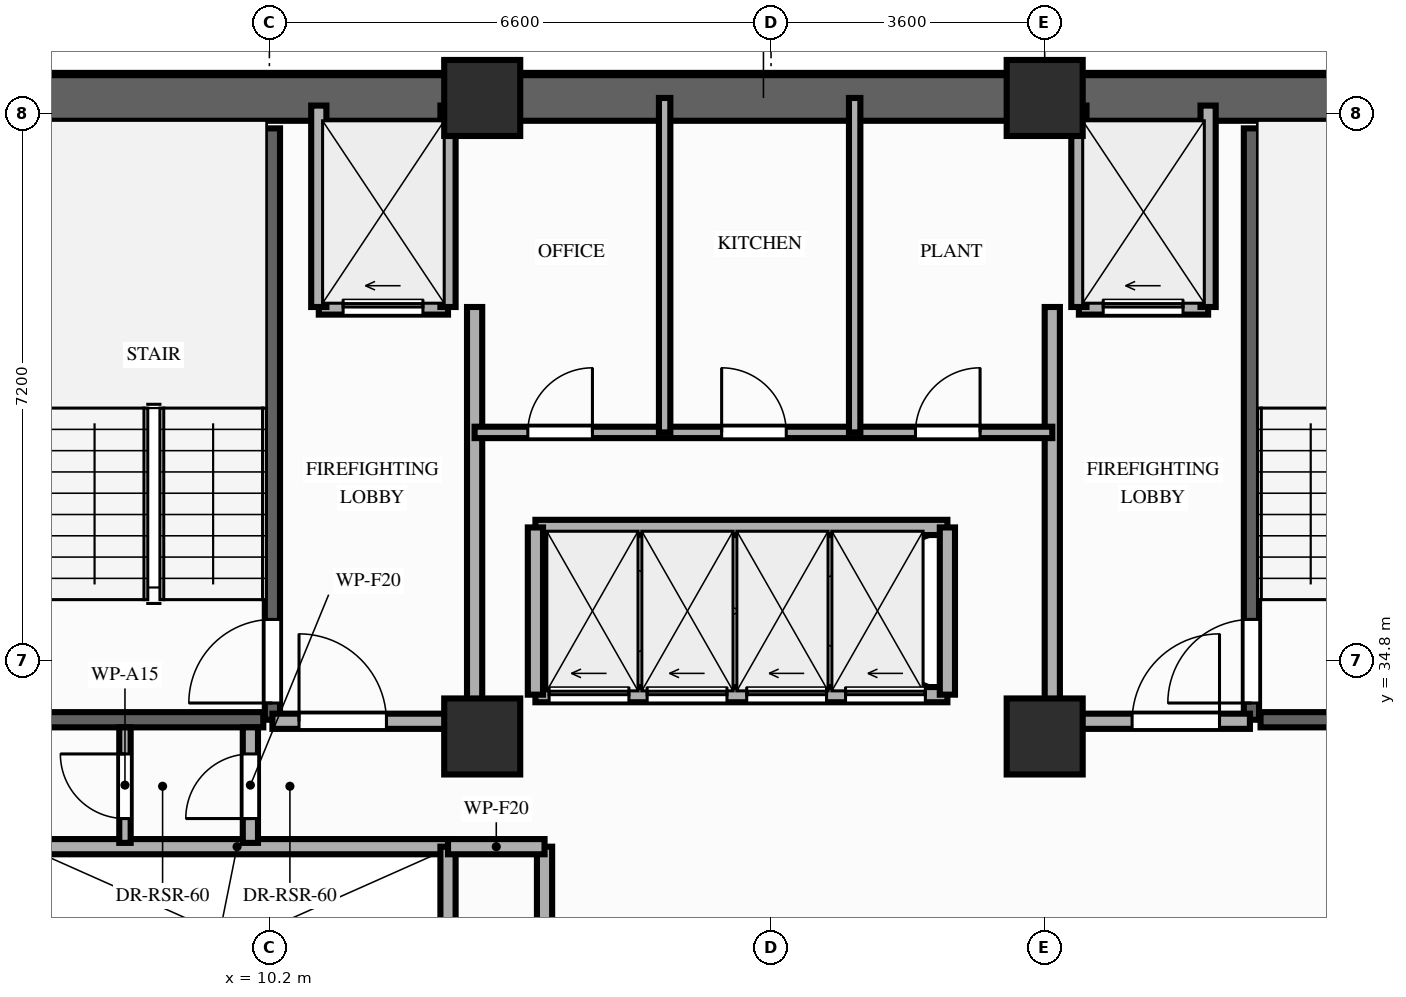
"""IFC4 building model, lengths in metres.
Left out: names, types, materials, properties, quantities, classifications, styles, units other than length and angle.
Written with IfcOpenShell. Run it as: python <this file> out.ifc"""

import sys

from ifc_helpers import new_model, si_unit, direction, frame, frame_2d, origin, origin_2d, place, context, subcontext, project, spatial, rectangle, extrude, element, fill, save


model = new_model("IFC4")
c1 = context("Model", 3, precision=1e-05, world=origin(), true_north=direction((0.0, 1.0)))
c2 = subcontext(c1, "Body", "Model", "MODEL_VIEW")
j1 = project(units=[si_unit("LENGTHUNIT", "METRE"), si_unit("PLANEANGLEUNIT", "RADIAN")], contexts=[c1])
p1 = place(None, origin())
s1 = spatial("IfcSite", under=j1, at=p1, CompositionType="ELEMENT")
p2 = place(p1, origin())
s2 = spatial("IfcBuilding", under=s1, at=p2, CompositionType="ELEMENT")
p3 = place(p2, frame((0.0, 0.0, 142.6)))
s3 = spatial("IfcBuildingStorey", under=s2, at=p3, CompositionType="ELEMENT", Elevation=142.6)
for number, where, z_axis, x_axis in (
    (1, (13.0, 33.8, 0.0), (0.0, 0.0, 1.0), (1.0, 0.0, 0.0)),
    (2, (20.4, 33.8, 0.0), (0.0, 0.0, 1.0), (1.0, 0.0, 0.0)),
    (3, (13.0, 42.2, 0.0), (0.0, 0.0, 1.0), (1.0, 0.0, 0.0)),
    (4, (20.4, 42.2, 0.0), (0.0, 0.0, 1.0), (1.0, 0.0, 0.0)),
):
    element("IfcColumn", number, at=place(p3, frame(where, z_axis=z_axis, x_axis=x_axis)), inside=s3, PredefinedType="COLUMN", context=c2, shape_type="SweptSolid", body=[
        extrude(rectangle(XDim=1.0, YDim=1.0, at=origin_2d()), origin(), (0.0, 0.0, 1.0), 3.2),
    ])
p4 = place(p3, frame((6.45, 42.2, 0.0), z_axis=(0.0, 0.0, 1.0), x_axis=(1.0, 0.0, 0.0)))
e5 = element("IfcWall", 5, at=p4, inside=s3, PredefinedType="SHEAR", context=c2, shape_type="SweptSolid", body=[
    extrude(rectangle(XDim=20.45, YDim=0.6, at=frame_2d((10.225, 0.0))), origin(), (0.0, 0.0, 1.0), 3.02),
])
p5 = place(p3, frame((10.24, 34.02, 0.0), z_axis=(0.0, 0.0, 1.0), x_axis=(0.0, 1.0, 0.0)))
e6 = element("IfcWall", 6, at=p5, inside=s3, PredefinedType="SHEAR", context=c2, shape_type="SweptSolid", body=[
    extrude(rectangle(XDim=7.78, YDim=0.2, at=frame_2d((3.89, 0.0))), origin(), (0.0, 0.0, 1.0), 3.02),
])
p6 = place(p5, frame((0.22, 0.0, 0.0)))
e7 = element("IfcOpeningElement", 7, at=p6, cuts=e6, PredefinedType="OPENING", context=c2, shape_type="SweptSolid", body=[
    extrude(rectangle(XDim=1.1, YDim=2.15, at=frame_2d((0.55, 1.075))), frame((0.0, 0.11, 0.0), z_axis=(0.0, -1.0, 0.0), x_axis=(1.0, 0.0, 0.0)), (0.0, 0.0, 1.0), 0.22),
])
p7 = place(p3, frame((7.24, 34.02, 0.0), z_axis=(0.0, 0.0, 1.0), x_axis=(1.0, 0.0, 0.0)))
e8 = element("IfcWall", 8, at=p7, inside=s3, PredefinedType="SHEAR", context=c2, shape_type="SweptSolid", body=[
    extrude(rectangle(XDim=2.88, YDim=0.2, at=frame_2d((1.44, 0.0))), origin(), (0.0, 0.0, 1.0), 3.02),
])
p8 = place(p3, frame((23.12, 34.02, 0.0), z_axis=(0.0, 0.0, 1.0), x_axis=(0.0, 1.0, 0.0)))
e9 = element("IfcWall", 9, at=p8, inside=s3, PredefinedType="SHEAR", context=c2, shape_type="SweptSolid", body=[
    extrude(rectangle(XDim=7.78, YDim=0.2, at=frame_2d((3.89, 0.0))), origin(), (0.0, 0.0, 1.0), 3.02),
])
p9 = place(p8, frame((0.22, 0.0, 0.0)))
e10 = element("IfcOpeningElement", 10, at=p9, cuts=e9, PredefinedType="OPENING", context=c2, shape_type="SweptSolid", body=[
    extrude(rectangle(XDim=1.1, YDim=2.15, at=frame_2d((0.55, 1.075))), frame((0.0, 0.11, 0.0), z_axis=(0.0, -1.0, 0.0), x_axis=(1.0, 0.0, 0.0)), (0.0, 0.0, 1.0), 0.22),
])
p10 = place(p3, frame((23.24, 34.02, 0.0), z_axis=(0.0, 0.0, 1.0), x_axis=(1.0, 0.0, 0.0)))
e11 = element("IfcWall", 11, at=p10, inside=s3, PredefinedType="SHEAR", context=c2, shape_type="SweptSolid", body=[
    extrude(rectangle(XDim=2.88, YDim=0.2, at=frame_2d((1.44, 0.0))), origin(), (0.0, 0.0, 1.0), 3.02),
])
p11 = place(p3, frame((7.0, 32.35, 0.0), z_axis=(0.0, 0.0, 1.0), x_axis=(1.0, 0.0, 0.0)))
e12 = element("IfcWall", 12, at=p11, inside=s3, PredefinedType="MOVABLE", context=c2, shape_type="SweptSolid", body=[
    extrude(rectangle(XDim=5.55, YDim=0.2, at=frame_2d((2.775, 0.0))), origin(), (0.0, 0.0, 1.0), 3.02),
])
p12 = place(p3, frame((12.55, 29.85, 0.0), z_axis=(0.0, 0.0, 1.0), x_axis=(0.0, 1.0, 0.0)))
e13 = element("IfcWall", 13, at=p12, inside=s3, PredefinedType="MOVABLE", context=c2, shape_type="SweptSolid", body=[
    extrude(rectangle(XDim=2.5, YDim=0.2, at=frame_2d((1.25, 0.0))), origin(), (0.0, 0.0, 1.0), 3.02),
])
p13 = place(p3, frame((10.85, 39.45, 0.0), z_axis=(0.0, 0.0, 1.0), x_axis=(1.0, 0.0, 0.0)))
e14 = element("IfcWall", 14, at=p13, inside=s3, PredefinedType="MOVABLE", context=c2, shape_type="SweptSolid", body=[
    extrude(rectangle(XDim=1.7, YDim=0.2, at=frame_2d((0.85, 0.0))), origin(), (0.0, 0.0, 1.0), 3.02),
])
p14 = place(p13, frame((0.32, 0.0, 0.0)))
e15 = element("IfcOpeningElement", 15, at=p14, cuts=e14, PredefinedType="OPENING", context=c2, shape_type="SweptSolid", body=[
    extrude(rectangle(XDim=1.05, YDim=2.15, at=frame_2d((0.525, 1.075))), frame((0.0, 0.11, 0.0), z_axis=(0.0, -1.0, 0.0), x_axis=(1.0, 0.0, 0.0)), (0.0, 0.0, 1.0), 0.22),
])
p15 = place(p3, frame((20.85, 39.45, 0.0), z_axis=(0.0, 0.0, 1.0), x_axis=(1.0, 0.0, 0.0)))
e16 = element("IfcWall", 16, at=p15, inside=s3, PredefinedType="MOVABLE", context=c2, shape_type="SweptSolid", body=[
    extrude(rectangle(XDim=1.7, YDim=0.2, at=frame_2d((0.85, 0.0))), origin(), (0.0, 0.0, 1.0), 3.02),
])
p16 = place(p15, frame((0.32, 0.0, 0.0)))
e17 = element("IfcOpeningElement", 17, at=p16, cuts=e16, PredefinedType="OPENING", context=c2, shape_type="SweptSolid", body=[
    extrude(rectangle(XDim=1.05, YDim=2.15, at=frame_2d((0.525, 1.075))), frame((0.0, 0.11, 0.0), z_axis=(0.0, -1.0, 0.0), x_axis=(1.0, 0.0, 0.0)), (0.0, 0.0, 1.0), 0.22),
])
for number, where, z_axis, x_axis in (
    (18, (10.85, 39.45, 0.0), (0.0, 0.0, 1.0), (0.0, 1.0, 0.0)),
    (19, (12.55, 39.45, 0.0), (0.0, 0.0, 1.0), (0.0, 1.0, 0.0)),
):
    element("IfcWall", number, at=place(p3, frame(where, z_axis=z_axis, x_axis=x_axis)), inside=s3, PredefinedType="MOVABLE", context=c2, shape_type="SweptSolid", body=[
        extrude(rectangle(XDim=2.65, YDim=0.2, at=frame_2d((1.325, 0.0))), origin(), (0.0, 0.0, 1.0), 2.45),
    ])
p17 = place(p3, frame((12.9, 34.0, 0.0), z_axis=(0.0, 0.0, 1.0), x_axis=(0.0, 1.0, 0.0)))
e20 = element("IfcWall", 20, at=p17, inside=s3, PredefinedType="PARTITIONING", context=c2, shape_type="SweptSolid", body=[
    extrude(rectangle(XDim=5.45, YDim=0.2, at=frame_2d((2.725, 0.0))), origin(), (0.0, 0.0, 1.0), 2.45),
])
p18 = place(p3, frame((10.24, 34.0, 0.0), z_axis=(0.0, 0.0, 1.0), x_axis=(1.0, 0.0, 0.0)))
e21 = element("IfcWall", 21, at=p18, inside=s3, PredefinedType="PARTITIONING", context=c2, shape_type="SweptSolid", body=[
    extrude(rectangle(XDim=2.66, YDim=0.2, at=frame_2d((1.33, 0.0))), origin(), (0.0, 0.0, 1.0), 2.45),
])
p19 = place(p18, frame((0.35, 0.0, 0.0)))
e22 = element("IfcOpeningElement", 22, at=p19, cuts=e21, PredefinedType="OPENING", context=c2, shape_type="SweptSolid", body=[
    extrude(rectangle(XDim=1.15, YDim=2.15, at=frame_2d((0.575, 1.075))), frame((0.0, 0.11, 0.0), z_axis=(0.0, -1.0, 0.0), x_axis=(1.0, 0.0, 0.0)), (0.0, 0.0, 1.0), 0.22),
])
for number, where, z_axis, x_axis in (
    (23, (20.85, 39.45, 0.0), (0.0, 0.0, 1.0), (0.0, 1.0, 0.0)),
    (24, (22.55, 39.45, 0.0), (0.0, 0.0, 1.0), (0.0, 1.0, 0.0)),
):
    element("IfcWall", number, at=place(p3, frame(where, z_axis=z_axis, x_axis=x_axis)), inside=s3, PredefinedType="MOVABLE", context=c2, shape_type="SweptSolid", body=[
        extrude(rectangle(XDim=2.65, YDim=0.2, at=frame_2d((1.325, 0.0))), origin(), (0.0, 0.0, 1.0), 2.45),
    ])
p20 = place(p3, frame((20.5, 34.0, 0.0), z_axis=(0.0, 0.0, 1.0), x_axis=(0.0, 1.0, 0.0)))
e25 = element("IfcWall", 25, at=p20, inside=s3, PredefinedType="PARTITIONING", context=c2, shape_type="SweptSolid", body=[
    extrude(rectangle(XDim=5.45, YDim=0.2, at=frame_2d((2.725, 0.0))), origin(), (0.0, 0.0, 1.0), 2.45),
])
p21 = place(p3, frame((20.5, 34.0, 0.0), z_axis=(0.0, 0.0, 1.0), x_axis=(1.0, 0.0, 0.0)))
e26 = element("IfcWall", 26, at=p21, inside=s3, PredefinedType="PARTITIONING", context=c2, shape_type="SweptSolid", body=[
    extrude(rectangle(XDim=2.6, YDim=0.2, at=frame_2d((1.3, 0.0))), origin(), (0.0, 0.0, 1.0), 2.45),
])
p22 = place(p21, frame((1.05, 0.0, 0.0)))
e27 = element("IfcOpeningElement", 27, at=p22, cuts=e26, PredefinedType="OPENING", context=c2, shape_type="SweptSolid", body=[
    extrude(rectangle(XDim=1.15, YDim=2.15, at=frame_2d((0.575, 1.075))), frame((0.0, 0.11, 0.0), z_axis=(0.0, -1.0, 0.0), x_axis=(1.0, 0.0, 0.0)), (0.0, 0.0, 1.0), 0.22),
])
p23 = place(p3, frame((9.95, 32.4, 0.0), z_axis=(0.0, 0.0, 1.0), x_axis=(0.0, 1.0, 0.0)))
e28 = element("IfcWall", 28, at=p23, inside=s3, PredefinedType="PARTITIONING", context=c2, shape_type="SweptSolid", body=[
    extrude(rectangle(XDim=1.52, YDim=0.2, at=frame_2d((0.76, 0.0))), origin(), (0.0, 0.0, 1.0), 2.45),
])
p24 = place(p23, frame((0.32, 0.0, 0.0)))
e29 = element("IfcOpeningElement", 29, at=p24, cuts=e28, PredefinedType="OPENING", context=c2, shape_type="SweptSolid", body=[
    extrude(rectangle(XDim=0.85, YDim=2.05, at=frame_2d((0.425, 1.025))), frame((0.0, 0.11, 0.0), z_axis=(0.0, -1.0, 0.0), x_axis=(1.0, 0.0, 0.0)), (0.0, 0.0, 1.0), 0.22),
])
p25 = place(p3, frame((8.3, 32.4, 0.0), z_axis=(0.0, 0.0, 1.0), x_axis=(0.0, 1.0, 0.0)))
e30 = element("IfcWall", 30, at=p25, inside=s3, PredefinedType="PARTITIONING", context=c2, shape_type="SweptSolid", body=[
    extrude(rectangle(XDim=1.52, YDim=0.15, at=frame_2d((0.76, 0.0))), origin(), (0.0, 0.0, 1.0), 2.45),
])
p26 = place(p25, frame((0.32, 0.0, 0.0)))
e31 = element("IfcOpeningElement", 31, at=p26, cuts=e30, PredefinedType="OPENING", context=c2, shape_type="SweptSolid", body=[
    extrude(rectangle(XDim=0.85, YDim=2.05, at=frame_2d((0.425, 1.025))), frame((0.0, 0.085, 0.0), z_axis=(0.0, -1.0, 0.0), x_axis=(1.0, 0.0, 0.0)), (0.0, 0.0, 1.0), 0.17),
])
p27 = place(p3, frame((13.82, 29.85, 0.0), z_axis=(0.0, 0.0, 1.0), x_axis=(0.0, 1.0, 0.0)))
e32 = element("IfcWall", 32, at=p27, inside=s3, PredefinedType="PARTITIONING", context=c2, shape_type="SweptSolid", body=[
    extrude(rectangle(XDim=2.5, YDim=0.2, at=frame_2d((1.25, 0.0))), origin(), (0.0, 0.0, 1.0), 3.02),
])
p28 = place(p3, frame((12.55, 32.35, 0.0), z_axis=(0.0, 0.0, 1.0), x_axis=(1.0, 0.0, 0.0)))
e33 = element("IfcWall", 33, at=p28, inside=s3, PredefinedType="PARTITIONING", context=c2, shape_type="SweptSolid", body=[
    extrude(rectangle(XDim=1.27, YDim=0.2, at=frame_2d((0.635, 0.0))), origin(), (0.0, 0.0, 1.0), 3.02),
])
p29 = place(p3, frame((12.9, 37.8, 0.0), z_axis=(0.0, 0.0, 1.0), x_axis=(1.0, 0.0, 0.0)))
e34 = element("IfcWall", 34, at=p29, inside=s3, PredefinedType="PARTITIONING", context=c2, shape_type="SweptSolid", body=[
    extrude(rectangle(XDim=7.6, YDim=0.15, at=frame_2d((3.8, 0.0))), origin(), (0.0, 0.0, 1.0), 3.02),
])
p30 = place(p29, frame((0.7, 0.0, 0.0)))
e35 = element("IfcOpeningElement", 35, at=p30, cuts=e34, PredefinedType="OPENING", context=c2, shape_type="SweptSolid", body=[
    extrude(rectangle(XDim=0.85, YDim=2.05, at=frame_2d((0.425, 1.025))), frame((0.0, 0.085, 0.0), z_axis=(0.0, -1.0, 0.0), x_axis=(1.0, 0.0, 0.0)), (0.0, 0.0, 1.0), 0.17),
])
p31 = place(p29, frame((3.25, 0.0, 0.0)))
e36 = element("IfcOpeningElement", 36, at=p31, cuts=e34, PredefinedType="OPENING", context=c2, shape_type="SweptSolid", body=[
    extrude(rectangle(XDim=0.85, YDim=2.05, at=frame_2d((0.425, 1.025))), frame((0.0, 0.085, 0.0), z_axis=(0.0, -1.0, 0.0), x_axis=(1.0, 0.0, 0.0)), (0.0, 0.0, 1.0), 0.17),
])
p32 = place(p29, frame((5.8, 0.0, 0.0)))
e37 = element("IfcOpeningElement", 37, at=p32, cuts=e34, PredefinedType="OPENING", context=c2, shape_type="SweptSolid", body=[
    extrude(rectangle(XDim=0.85, YDim=2.05, at=frame_2d((0.425, 1.025))), frame((0.0, 0.085, 0.0), z_axis=(0.0, -1.0, 0.0), x_axis=(1.0, 0.0, 0.0)), (0.0, 0.0, 1.0), 0.17),
])
for number, where, z_axis, x_axis in (
    (38, (15.4, 37.8, 0.0), (0.0, 0.0, 1.0), (0.0, 1.0, 0.0)),
    (39, (17.9, 37.8, 0.0), (0.0, 0.0, 1.0), (0.0, 1.0, 0.0)),
):
    element("IfcWall", number, at=place(p3, frame(where, z_axis=z_axis, x_axis=x_axis)), inside=s3, PredefinedType="PARTITIONING", context=c2, shape_type="SweptSolid", body=[
        extrude(rectangle(XDim=4.4, YDim=0.15, at=frame_2d((2.2, 0.0))), origin(), (0.0, 0.0, 1.0), 2.45),
    ])
p33 = place(p3, frame((13.7, 34.35, 0.0), z_axis=(0.0, 0.0, 1.0), x_axis=(1.0, 0.0, 0.0)))
e40 = element("IfcWall", 40, at=p33, inside=s3, PredefinedType="MOVABLE", context=c2, shape_type="SweptSolid", body=[
    extrude(rectangle(XDim=5.42, YDim=0.2, at=frame_2d((2.71, 0.0))), origin(), (0.0, 0.0, 1.0), 3.02),
])
p34 = place(p33, frame((0.18, 0.0, 0.0)))
e41 = element("IfcOpeningElement", 41, at=p34, cuts=e40, PredefinedType="OPENING", context=c2, shape_type="SweptSolid", body=[
    extrude(rectangle(XDim=1.05, YDim=2.15, at=frame_2d((0.525, 1.075))), frame((0.0, 0.11, 0.0), z_axis=(0.0, -1.0, 0.0), x_axis=(1.0, 0.0, 0.0)), (0.0, 0.0, 1.0), 0.22),
])
p35 = place(p33, frame((1.47, 0.0, 0.0)))
e42 = element("IfcOpeningElement", 42, at=p35, cuts=e40, PredefinedType="OPENING", context=c2, shape_type="SweptSolid", body=[
    extrude(rectangle(XDim=1.05, YDim=2.15, at=frame_2d((0.525, 1.075))), frame((0.0, 0.11, 0.0), z_axis=(0.0, -1.0, 0.0), x_axis=(1.0, 0.0, 0.0)), (0.0, 0.0, 1.0), 0.22),
])
p36 = place(p33, frame((2.78, 0.0, 0.0)))
e43 = element("IfcOpeningElement", 43, at=p36, cuts=e40, PredefinedType="OPENING", context=c2, shape_type="SweptSolid", body=[
    extrude(rectangle(XDim=1.05, YDim=2.15, at=frame_2d((0.525, 1.075))), frame((0.0, 0.11, 0.0), z_axis=(0.0, -1.0, 0.0), x_axis=(1.0, 0.0, 0.0)), (0.0, 0.0, 1.0), 0.22),
])
p37 = place(p33, frame((4.08, 0.0, 0.0)))
e44 = element("IfcOpeningElement", 44, at=p37, cuts=e40, PredefinedType="OPENING", context=c2, shape_type="SweptSolid", body=[
    extrude(rectangle(XDim=1.05, YDim=2.15, at=frame_2d((0.525, 1.075))), frame((0.0, 0.11, 0.0), z_axis=(0.0, -1.0, 0.0), x_axis=(1.0, 0.0, 0.0)), (0.0, 0.0, 1.0), 0.22),
])
p38 = place(p3, frame((13.7, 36.55, 0.0), z_axis=(0.0, 0.0, 1.0), x_axis=(1.0, 0.0, 0.0)))
e45 = element("IfcWall", 45, at=p38, inside=s3, PredefinedType="MOVABLE", context=c2, shape_type="SweptSolid", body=[
    extrude(rectangle(XDim=5.42, YDim=0.2, at=frame_2d((2.71, 0.0))), origin(), (0.0, 0.0, 1.0), 3.02),
])
for number, where, z_axis, x_axis in (
    (46, (13.7, 34.35, 0.0), (0.0, 0.0, 1.0), (0.0, 1.0, 0.0)),
    (47, (19.12, 34.35, 0.0), (0.0, 0.0, 1.0), (0.0, 1.0, 0.0)),
):
    element("IfcWall", number, at=place(p3, frame(where, z_axis=z_axis, x_axis=x_axis)), inside=s3, PredefinedType="MOVABLE", context=c2, shape_type="SweptSolid", body=[
        extrude(rectangle(XDim=2.2, YDim=0.2, at=frame_2d((1.1, 0.0))), origin(), (0.0, 0.0, 1.0), 3.02),
    ])
p39 = place(p6, origin())
e48 = element("IfcDoor", 48, at=p39, inside=s3, OperationType="SINGLE_SWING_LEFT", PredefinedType="DOOR", context=c2, shape_type="SweptSolid", body=[
    extrude(rectangle(XDim=1.1, YDim=2.15, at=frame_2d((0.55, 1.075))), frame((0.0, 0.025, 0.0), z_axis=(0.0, -1.0, 0.0), x_axis=(1.0, 0.0, 0.0)), (0.0, 0.0, 1.0), 0.05),
])
fill(e7, e48)
p40 = place(p9, origin())
e49 = element("IfcDoor", 49, at=p40, inside=s3, OperationType="SINGLE_SWING_LEFT", PredefinedType="DOOR", context=c2, shape_type="SweptSolid", body=[
    extrude(rectangle(XDim=1.1, YDim=2.15, at=frame_2d((0.55, 1.075))), frame((0.0, 0.025, 0.0), z_axis=(0.0, -1.0, 0.0), x_axis=(1.0, 0.0, 0.0)), (0.0, 0.0, 1.0), 0.05),
])
fill(e10, e49)
p41 = place(p14, origin())
e50 = element("IfcDoor", 50, at=p41, inside=s3, OperationType="SLIDING_TO_LEFT", PredefinedType="DOOR", context=c2, shape_type="SweptSolid", body=[
    extrude(rectangle(XDim=1.05, YDim=2.15, at=frame_2d((0.525, 1.075))), frame((0.0, 0.025, 0.0), z_axis=(0.0, -1.0, 0.0), x_axis=(1.0, 0.0, 0.0)), (0.0, 0.0, 1.0), 0.05),
])
fill(e15, e50)
p42 = place(p16, origin())
e51 = element("IfcDoor", 51, at=p42, inside=s3, OperationType="SLIDING_TO_LEFT", PredefinedType="DOOR", context=c2, shape_type="SweptSolid", body=[
    extrude(rectangle(XDim=1.05, YDim=2.15, at=frame_2d((0.525, 1.075))), frame((0.0, 0.025, 0.0), z_axis=(0.0, -1.0, 0.0), x_axis=(1.0, 0.0, 0.0)), (0.0, 0.0, 1.0), 0.05),
])
fill(e17, e51)
p43 = place(p19, origin())
e52 = element("IfcDoor", 52, at=p43, inside=s3, OperationType="SINGLE_SWING_LEFT", PredefinedType="DOOR", context=c2, shape_type="SweptSolid", body=[
    extrude(rectangle(XDim=1.15, YDim=2.15, at=frame_2d((0.575, 1.075))), frame((0.0, 0.025, 0.0), z_axis=(0.0, -1.0, 0.0), x_axis=(1.0, 0.0, 0.0)), (0.0, 0.0, 1.0), 0.05),
])
fill(e22, e52)
p44 = place(p22, origin())
e53 = element("IfcDoor", 53, at=p44, inside=s3, OperationType="SINGLE_SWING_RIGHT", PredefinedType="DOOR", context=c2, shape_type="SweptSolid", body=[
    extrude(rectangle(XDim=1.15, YDim=2.15, at=frame_2d((0.575, 1.075))), frame((0.0, 0.025, 0.0), z_axis=(0.0, -1.0, 0.0), x_axis=(1.0, 0.0, 0.0)), (0.0, 0.0, 1.0), 0.05),
])
fill(e27, e53)
p45 = place(p24, origin())
e54 = element("IfcDoor", 54, at=p45, inside=s3, OperationType="SINGLE_SWING_LEFT", PredefinedType="DOOR", context=c2, shape_type="SweptSolid", body=[
    extrude(rectangle(XDim=0.85, YDim=2.05, at=frame_2d((0.425, 1.025))), frame((0.0, 0.025, 0.0), z_axis=(0.0, -1.0, 0.0), x_axis=(1.0, 0.0, 0.0)), (0.0, 0.0, 1.0), 0.05),
])
fill(e29, e54)
p46 = place(p26, origin())
e55 = element("IfcDoor", 55, at=p46, inside=s3, OperationType="SINGLE_SWING_RIGHT", PredefinedType="DOOR", context=c2, shape_type="SweptSolid", body=[
    extrude(rectangle(XDim=0.85, YDim=2.05, at=frame_2d((0.425, 1.025))), frame((0.0, 0.025, 0.0), z_axis=(0.0, -1.0, 0.0), x_axis=(1.0, 0.0, 0.0)), (0.0, 0.0, 1.0), 0.05),
])
fill(e31, e55)
p47 = place(p30, origin())
e56 = element("IfcDoor", 56, at=p47, inside=s3, OperationType="SINGLE_SWING_RIGHT", PredefinedType="DOOR", context=c2, shape_type="SweptSolid", body=[
    extrude(rectangle(XDim=0.85, YDim=2.05, at=frame_2d((0.425, 1.025))), frame((0.0, 0.025, 0.0), z_axis=(0.0, -1.0, 0.0), x_axis=(1.0, 0.0, 0.0)), (0.0, 0.0, 1.0), 0.05),
])
fill(e35, e56)
p48 = place(p31, origin())
e57 = element("IfcDoor", 57, at=p48, inside=s3, OperationType="SINGLE_SWING_LEFT", PredefinedType="DOOR", context=c2, shape_type="SweptSolid", body=[
    extrude(rectangle(XDim=0.85, YDim=2.05, at=frame_2d((0.425, 1.025))), frame((0.0, 0.025, 0.0), z_axis=(0.0, -1.0, 0.0), x_axis=(1.0, 0.0, 0.0)), (0.0, 0.0, 1.0), 0.05),
])
fill(e36, e57)
p49 = place(p32, origin())
e58 = element("IfcDoor", 58, at=p49, inside=s3, OperationType="SINGLE_SWING_RIGHT", PredefinedType="DOOR", context=c2, shape_type="SweptSolid", body=[
    extrude(rectangle(XDim=0.85, YDim=2.05, at=frame_2d((0.425, 1.025))), frame((0.0, 0.025, 0.0), z_axis=(0.0, -1.0, 0.0), x_axis=(1.0, 0.0, 0.0)), (0.0, 0.0, 1.0), 0.05),
])
fill(e37, e58)
p50 = place(p34, origin())
e59 = element("IfcDoor", 59, at=p50, inside=s3, OperationType="SLIDING_TO_LEFT", PredefinedType="DOOR", context=c2, shape_type="SweptSolid", body=[
    extrude(rectangle(XDim=1.05, YDim=2.15, at=frame_2d((0.525, 1.075))), frame((0.0, 0.025, 0.0), z_axis=(0.0, -1.0, 0.0), x_axis=(1.0, 0.0, 0.0)), (0.0, 0.0, 1.0), 0.05),
])
fill(e41, e59)
p51 = place(p35, origin())
e60 = element("IfcDoor", 60, at=p51, inside=s3, OperationType="SLIDING_TO_LEFT", PredefinedType="DOOR", context=c2, shape_type="SweptSolid", body=[
    extrude(rectangle(XDim=1.05, YDim=2.15, at=frame_2d((0.525, 1.075))), frame((0.0, 0.025, 0.0), z_axis=(0.0, -1.0, 0.0), x_axis=(1.0, 0.0, 0.0)), (0.0, 0.0, 1.0), 0.05),
])
fill(e42, e60)
p52 = place(p36, origin())
e61 = element("IfcDoor", 61, at=p52, inside=s3, OperationType="SLIDING_TO_LEFT", PredefinedType="DOOR", context=c2, shape_type="SweptSolid", body=[
    extrude(rectangle(XDim=1.05, YDim=2.15, at=frame_2d((0.525, 1.075))), frame((0.0, 0.025, 0.0), z_axis=(0.0, -1.0, 0.0), x_axis=(1.0, 0.0, 0.0)), (0.0, 0.0, 1.0), 0.05),
])
fill(e43, e61)
p53 = place(p37, origin())
e62 = element("IfcDoor", 62, at=p53, inside=s3, OperationType="SLIDING_TO_LEFT", PredefinedType="DOOR", context=c2, shape_type="SweptSolid", body=[
    extrude(rectangle(XDim=1.05, YDim=2.15, at=frame_2d((0.525, 1.075))), frame((0.0, 0.025, 0.0), z_axis=(0.0, -1.0, 0.0), x_axis=(1.0, 0.0, 0.0)), (0.0, 0.0, 1.0), 0.05),
])
fill(e44, e62)
save(model, sys.argv[1])
